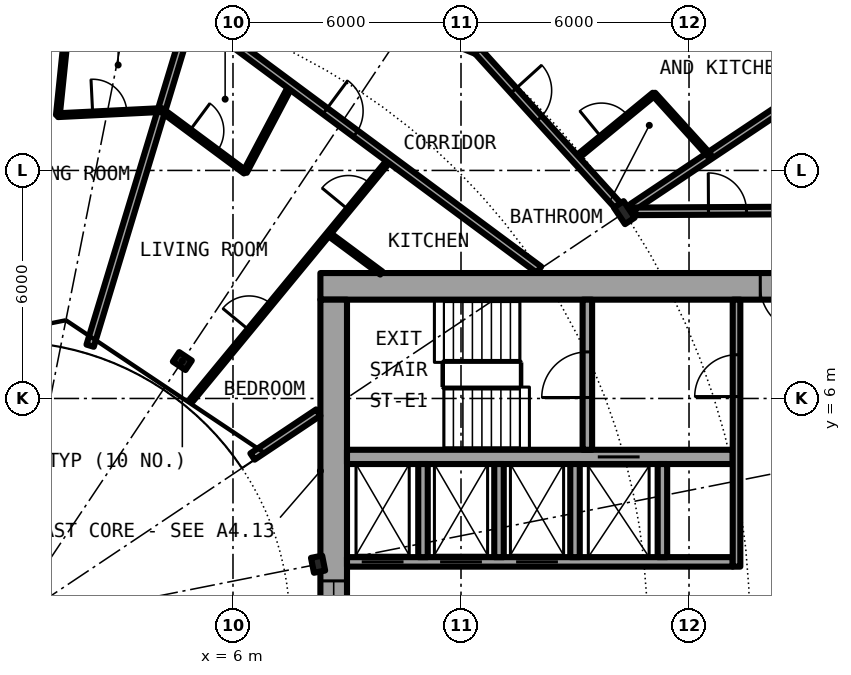
"""IFC4 building model, lengths in metres.
Left out: names, types, materials, properties, quantities, classifications, styles, units other than length and angle.
Written with IfcOpenShell. Run it as: python <this file> out.ifc"""

import sys

from ifc_helpers import new_model, si_unit, direction, frame, frame_2d, origin, origin_2d, place, context, subcontext, project, spatial, rectangle, i_section, extrude, element, fill, save


model = new_model("IFC4")
c1 = context("Model", 3, precision=1e-05, world=origin(), true_north=direction((0.0, 1.0)))
c2 = subcontext(c1, "Body", "Model", "MODEL_VIEW")
j1 = project(units=[si_unit("LENGTHUNIT", "METRE"), si_unit("PLANEANGLEUNIT", "RADIAN")], contexts=[c1])
p1 = place(None, origin())
s1 = spatial("IfcSite", under=j1, at=p1, CompositionType="ELEMENT")
p2 = place(p1, origin())
s2 = spatial("IfcBuilding", under=s1, at=p2, CompositionType="ELEMENT")
p3 = place(p2, frame((0.0, 0.0, 69.7)))
s3 = spatial("IfcBuildingStorey", under=s2, at=p3, CompositionType="ELEMENT", Elevation=69.7)
p4 = place(p3, frame((16.297, 10.889, 0.0), z_axis=(0.0, 0.0, 1.0), x_axis=(0.831469612303, 0.55557023302, 0.0)))
e1 = element("IfcColumn", 1, at=p4, inside=s3, PredefinedType="COLUMN", context=c2, shape_type="SweptSolid", body=[
    extrude(i_section(OverallWidth=0.306, OverallDepth=0.524, WebThickness=0.021, FlangeThickness=0.04, FilletRadius=0.027, at=origin_2d()), origin(), (0.0, 0.0, 1.0), 3.05),
])
for number, where, z_axis, x_axis in (
    (2, (8.239, 1.639, 0.0), (0.0, 0.0, 1.0), (0.981, 0.195, 0.0)),
    (3, (4.667, 6.984, 0.0), (0.0, 0.0, 1.0), (0.556, 0.831, 0.0)),
):
    element("IfcColumn", number, at=place(p3, frame(where, z_axis=z_axis, x_axis=x_axis)), inside=s3, PredefinedType="COLUMN", context=c2, shape_type="SweptSolid", body=[
        extrude(i_section(OverallWidth=0.3, OverallDepth=0.4, WebThickness=0.013, FlangeThickness=0.024, FilletRadius=0.027, at=origin_2d()), origin(), (0.0, 0.0, 1.0), 3.05),
    ])
p5 = place(p3, frame((22.699, 15.167, 0.0), z_axis=(0.0, 0.0, 1.0), x_axis=(-0.634382322723, 0.773019449054, 0.0)))
e4 = element("IfcWall", 4, at=p5, inside=s3, PredefinedType="SOLIDWALL", context=c2, shape_type="SweptSolid", body=[
    extrude(rectangle(XDim=5.352, YDim=0.25, at=frame_2d((2.676, 0.0))), origin(), (0.0, 0.0, 1.0), 2.7),
])
p6 = place(p5, frame((0.841, 0.0, 0.0)))
e5 = element("IfcOpeningElement", 5, at=p6, cuts=e4, PredefinedType="OPENING", context=c2, shape_type="SweptSolid", body=[
    extrude(rectangle(XDim=1.0, YDim=2.2, at=frame_2d((0.5, 1.1))), frame((0.0, 0.135, 0.0), z_axis=(0.0, -1.0, 0.0), x_axis=(1.0, 0.0, 0.0)), (0.0, 0.0, 1.0), 0.27),
])
p7 = place(p5, frame((3.111, 0.0, 0.3)))
e6 = element("IfcOpeningElement", 6, at=p7, cuts=e4, PredefinedType="OPENING", context=c2, shape_type="SweptSolid", body=[
    extrude(rectangle(XDim=1.8, YDim=2.1, at=frame_2d((0.9, 1.05))), frame((0.0, 0.135, 0.0), z_axis=(0.0, -1.0, 0.0), x_axis=(1.0, 0.0, 0.0)), (0.0, 0.0, 1.0), 0.27),
])
p8 = place(p3, frame((22.3, 8.95, 0.0), z_axis=(0.0, 0.0, 1.0), x_axis=(-1.0, 0.0, 0.0)))
e7 = element("IfcWall", 7, at=p8, inside=s3, PredefinedType="SHEAR", context=c2, shape_type="SweptSolid", body=[
    extrude(rectangle(XDim=14.0, YDim=0.7, at=frame_2d((7.0, 0.0))), origin(), (0.0, 0.0, 1.0), 3.05),
])
p9 = place(p8, frame((1.225, 0.0, 0.0)))
e8 = element("IfcOpeningElement", 8, at=p9, cuts=e7, PredefinedType="OPENING", context=c2, shape_type="SweptSolid", body=[
    extrude(rectangle(XDim=1.2, YDim=2.3, at=frame_2d((0.6, 1.15))), frame((0.0, 0.36, 0.0), z_axis=(0.0, -1.0, 0.0), x_axis=(1.0, 0.0, 0.0)), (0.0, 0.0, 1.0), 0.72),
])
p10 = place(p3, frame((8.65, -8.6, 0.0), z_axis=(0.0, 0.0, 1.0), x_axis=(0.0, 1.0, 0.0)))
e9 = element("IfcWall", 9, at=p10, inside=s3, PredefinedType="SHEAR", context=c2, shape_type="SweptSolid", body=[
    extrude(rectangle(XDim=17.2, YDim=0.7, at=frame_2d((8.6, 0.0))), origin(), (0.0, 0.0, 1.0), 3.05),
])
p11 = place(p10, frame((7.4, 0.0, 0.1)))
e10 = element("IfcOpeningElement", 10, at=p11, cuts=e9, PredefinedType="OPENING", context=c2, shape_type="SweptSolid", body=[
    extrude(rectangle(XDim=2.4, YDim=2.2, at=frame_2d((1.2, 1.1))), frame((0.0, 0.36, 0.0), z_axis=(0.0, -1.0, 0.0), x_axis=(1.0, 0.0, 0.0)), (0.0, 0.0, 1.0), 0.72),
])
p12 = place(p3, frame((9.0, 1.7, 0.0), z_axis=(0.0, 0.0, 1.0), x_axis=(1.0, 0.0, 0.0)))
e11 = element("IfcWall", 11, at=p12, inside=s3, PredefinedType="SHEAR", context=c2, shape_type="SweptSolid", body=[
    extrude(rectangle(XDim=10.15, YDim=0.25, at=frame_2d((5.075, 0.0))), origin(), (0.0, 0.0, 1.0), 3.05),
])
p13 = place(p12, frame((0.387, 0.0, 0.0)))
e12 = element("IfcOpeningElement", 12, at=p13, cuts=e11, PredefinedType="OPENING", context=c2, shape_type="SweptSolid", body=[
    extrude(rectangle(XDim=1.1, YDim=2.3, at=frame_2d((0.55, 1.15))), frame((0.0, 0.135, 0.0), z_axis=(0.0, -1.0, 0.0), x_axis=(1.0, 0.0, 0.0)), (0.0, 0.0, 1.0), 0.27),
])
p14 = place(p12, frame((2.45, 0.0, 0.0)))
e13 = element("IfcOpeningElement", 13, at=p14, cuts=e11, PredefinedType="OPENING", context=c2, shape_type="SweptSolid", body=[
    extrude(rectangle(XDim=1.1, YDim=2.3, at=frame_2d((0.55, 1.15))), frame((0.0, 0.135, 0.0), z_axis=(0.0, -1.0, 0.0), x_axis=(1.0, 0.0, 0.0)), (0.0, 0.0, 1.0), 0.27),
])
p15 = place(p12, frame((4.45, 0.0, 0.0)))
e14 = element("IfcOpeningElement", 14, at=p15, cuts=e11, PredefinedType="OPENING", context=c2, shape_type="SweptSolid", body=[
    extrude(rectangle(XDim=1.1, YDim=2.3, at=frame_2d((0.55, 1.15))), frame((0.0, 0.135, 0.0), z_axis=(0.0, -1.0, 0.0), x_axis=(1.0, 0.0, 0.0)), (0.0, 0.0, 1.0), 0.27),
])
p16 = place(p3, frame((9.0, 4.462, 0.0), z_axis=(0.0, 0.0, 1.0), x_axis=(1.0, 0.0, 0.0)))
e15 = element("IfcWall", 15, at=p16, inside=s3, PredefinedType="SHEAR", context=c2, shape_type="SweptSolid", body=[
    extrude(rectangle(XDim=10.15, YDim=0.375, at=frame_2d((5.075, 0.0))), origin(), (0.0, 0.0, 1.0), 3.05),
])
p17 = place(p16, frame((6.6, 0.0, 0.0)))
e16 = element("IfcOpeningElement", 16, at=p17, cuts=e15, PredefinedType="OPENING", context=c2, shape_type="SweptSolid", body=[
    extrude(rectangle(XDim=1.1, YDim=2.3, at=frame_2d((0.55, 1.15))), frame((0.0, 0.198, 0.0), z_axis=(0.0, -1.0, 0.0), x_axis=(1.0, 0.0, 0.0)), (0.0, 0.0, 1.0), 0.395),
])
p18 = place(p3, frame((15.325, 4.65, 0.0), z_axis=(0.0, 0.0, 1.0), x_axis=(0.0, 1.0, 0.0)))
e17 = element("IfcWall", 17, at=p18, inside=s3, PredefinedType="SHEAR", context=c2, shape_type="SweptSolid", body=[
    extrude(rectangle(XDim=3.95, YDim=0.25, at=frame_2d((1.975, 0.0))), origin(), (0.0, 0.0, 1.0), 3.05),
])
p19 = place(p18, frame((1.375, 0.0, 0.0)))
e18 = element("IfcOpeningElement", 18, at=p19, cuts=e17, PredefinedType="OPENING", context=c2, shape_type="SweptSolid", body=[
    extrude(rectangle(XDim=1.2, YDim=2.3, at=frame_2d((0.6, 1.15))), frame((0.0, 0.135, 0.0), z_axis=(0.0, -1.0, 0.0), x_axis=(1.0, 0.0, 0.0)), (0.0, 0.0, 1.0), 0.27),
])
for number, where, z_axis, x_axis in (
    (19, (15.0, 1.825, 0.0), (0.0, 0.0, 1.0), (0.0, 1.0, 0.0)),
    (20, (17.3, 1.825, 0.0), (0.0, 0.0, 1.0), (0.0, 1.0, 0.0)),
):
    element("IfcWall", number, at=place(p3, frame(where, z_axis=z_axis, x_axis=x_axis)), inside=s3, PredefinedType="SOLIDWALL", context=c2, shape_type="SweptSolid", body=[
        extrude(rectangle(XDim=2.45, YDim=0.25, at=frame_2d((1.225, 0.0))), origin(), (0.0, 0.0, 1.0), 2.7),
    ])
p20 = place(p3, frame((19.25, 1.575, 0.0), z_axis=(0.0, 0.0, 1.0), x_axis=(0.0, 1.0, 0.0)))
e21 = element("IfcWall", 21, at=p20, inside=s3, PredefinedType="SOLIDWALL", context=c2, shape_type="SweptSolid", body=[
    extrude(rectangle(XDim=7.025, YDim=0.2, at=frame_2d((3.513, 0.0))), origin(), (0.0, 0.0, 1.0), 2.7),
])
p21 = place(p20, frame((4.475, 0.0, 0.0)))
e22 = element("IfcOpeningElement", 22, at=p21, cuts=e21, PredefinedType="OPENING", context=c2, shape_type="SweptSolid", body=[
    extrude(rectangle(XDim=1.1, YDim=2.3, at=frame_2d((0.55, 1.15))), frame((0.0, 0.11, 0.0), z_axis=(0.0, -1.0, 0.0), x_axis=(1.0, 0.0, 0.0)), (0.0, 0.0, 1.0), 0.22),
])
for number, where, z_axis, x_axis in (
    (23, (11.0, 1.825, 0.0), (0.0, 0.0, 1.0), (0.0, 1.0, 0.0)),
    (24, (13.0, 1.825, 0.0), (0.0, 0.0, 1.0), (0.0, 1.0, 0.0)),
):
    element("IfcWall", number, at=place(p3, frame(where, z_axis=z_axis, x_axis=x_axis)), inside=s3, PredefinedType="SOLIDWALL", context=c2, shape_type="SweptSolid", body=[
        extrude(rectangle(XDim=2.45, YDim=0.25, at=frame_2d((1.225, 0.0))), origin(), (0.0, 0.0, 1.0), 2.7),
    ])
p22 = place(p3, frame((16.515, 11.034, 0.0), z_axis=(0.0, 0.0, 1.0), x_axis=(0.831382022135, 0.555701298605, 0.0)))
e25 = element("IfcWall", 25, at=p22, inside=s3, PredefinedType="PARTITIONING", context=c2, shape_type="SweptSolid", body=[
    extrude(rectangle(XDim=7.313, YDim=0.2, at=frame_2d((3.657, 0.0))), origin(), (0.0, 0.0, 1.0), 2.7),
])
p23 = place(p3, frame((1.392, 13.454, 0.0), z_axis=(0.0, 0.0, 1.0), x_axis=(0.102594773028, 0.994723234145, 0.0)))
e26 = element("IfcWall", 26, at=p23, inside=s3, PredefinedType="PARTITIONING", context=c2, shape_type="SweptSolid", body=[
    extrude(rectangle(XDim=2.573, YDim=0.1, at=frame_2d((1.286, 0.0))), origin(), (0.0, 0.0, 1.0), 2.7),
])
p24 = place(p3, frame((2.241, 7.388, 0.0), z_axis=(0.0, 0.0, 1.0), x_axis=(0.290323311932, 0.956928615179, 0.0)))
e27 = element("IfcWall", 27, at=p24, inside=s3, PredefinedType="PARTITIONING", context=c2, shape_type="SweptSolid", body=[
    extrude(rectangle(XDim=9.179, YDim=0.2, at=frame_2d((4.59, 0.0))), origin(), (0.0, 0.0, 1.0), 2.7),
])
p25 = place(p3, frame((4.909, 5.958, 0.0), z_axis=(0.0, 0.0, 1.0), x_axis=(0.635976043025, 0.771708800454, 0.0)))
e28 = element("IfcWall", 28, at=p25, inside=s3, PredefinedType="PARTITIONING", context=c2, shape_type="SweptSolid", body=[
    extrude(rectangle(XDim=8.213, YDim=0.1, at=frame_2d((4.106, 0.0))), origin(), (0.0, 0.0, 1.0), 2.7),
])
p26 = place(p25, frame((6.49, 0.0, 0.0)))
e29 = element("IfcOpeningElement", 29, at=p26, cuts=e28, PredefinedType="OPENING", context=c2, shape_type="SweptSolid", body=[
    extrude(rectangle(XDim=0.9, YDim=2.3, at=frame_2d((0.45, 1.15))), frame((0.0, 0.06, 0.0), z_axis=(0.0, -1.0, 0.0), x_axis=(1.0, 0.0, 0.0)), (0.0, 0.0, 1.0), 0.12),
])
p27 = place(p25, frame((2.384, 0.0, 0.0)))
e30 = element("IfcOpeningElement", 30, at=p27, cuts=e28, PredefinedType="OPENING", context=c2, shape_type="SweptSolid", body=[
    extrude(rectangle(XDim=0.9, YDim=2.3, at=frame_2d((0.45, 1.15))), frame((0.0, 0.06, 0.0), z_axis=(0.0, -1.0, 0.0), x_axis=(1.0, 0.0, 0.0)), (0.0, 0.0, 1.0), 0.12),
])
p28 = place(p3, frame((6.318, 11.96, 0.0), z_axis=(0.0, 0.0, 1.0), x_axis=(0.467001992543, 0.884256263173, 0.0)))
e31 = element("IfcWall", 31, at=p28, inside=s3, PredefinedType="PARTITIONING", context=c2, shape_type="SweptSolid", body=[
    extrude(rectangle(XDim=2.572, YDim=0.1, at=frame_2d((1.286, 0.0))), origin(), (0.0, 0.0, 1.0), 2.7),
])
p29 = place(p3, frame((12.435, 15.15, 0.0), z_axis=(0.0, 0.0, 1.0), x_axis=(0.634458323308, 0.772957072537, 0.0)))
e32 = element("IfcWall", 32, at=p29, inside=s3, PredefinedType="PARTITIONING", context=c2, shape_type="SweptSolid", body=[
    extrude(rectangle(XDim=7.576, YDim=0.2, at=frame_2d((3.788, 0.0))), origin(), (0.0, 0.0, 1.0), 2.7),
])
p30 = place(p3, frame((15.009, 12.31, 0.0), z_axis=(0.0, 0.0, 1.0), x_axis=(0.77319617123, 0.634166918717, 0.0)))
e33 = element("IfcWall", 33, at=p30, inside=s3, PredefinedType="PARTITIONING", context=c2, shape_type="SweptSolid", body=[
    extrude(rectangle(XDim=2.675, YDim=0.1, at=frame_2d((1.337, 0.0))), origin(), (0.0, 0.0, 1.0), 2.7),
])
p31 = place(p30, frame((0.887, 0.0, 0.0)))
e34 = element("IfcOpeningElement", 34, at=p31, cuts=e33, PredefinedType="OPENING", context=c2, shape_type="SweptSolid", body=[
    extrude(rectangle(XDim=0.9, YDim=2.3, at=frame_2d((0.45, 1.15))), frame((0.0, 0.06, 0.0), z_axis=(0.0, -1.0, 0.0), x_axis=(1.0, 0.0, 0.0)), (0.0, 0.0, 1.0), 0.12),
])
p32 = place(p3, frame((6.513, 4.472, 0.0), z_axis=(0.0, 0.0, 1.0), x_axis=(0.831382204863, 0.555701025225, 0.0)))
e35 = element("IfcWall", 35, at=p32, inside=s3, PredefinedType="PARTITIONING", context=c2, shape_type="SweptSolid", body=[
    extrude(rectangle(XDim=2.082, YDim=0.2, at=frame_2d((1.041, 0.0))), origin(), (0.0, 0.0, 1.0), 2.7),
])
p33 = place(p3, frame((16.589, 10.924, 0.0), z_axis=(0.0, 0.0, 1.0), x_axis=(0.999987054722, 0.005088259783, 0.0)))
e36 = element("IfcWall", 36, at=p33, inside=s3, PredefinedType="PARTITIONING", context=c2, shape_type="SweptSolid", body=[
    extrude(rectangle(XDim=5.086, YDim=0.2, at=frame_2d((2.543, 0.0))), origin(), (0.0, 0.0, 1.0), 2.7),
])
p34 = place(p33, frame((1.923, 0.0, 0.0)))
e37 = element("IfcOpeningElement", 37, at=p34, cuts=e36, PredefinedType="OPENING", context=c2, shape_type="SweptSolid", body=[
    extrude(rectangle(XDim=1.0, YDim=2.3, at=frame_2d((0.5, 1.15))), frame((0.0, 0.11, 0.0), z_axis=(0.0, -1.0, 0.0), x_axis=(1.0, 0.0, 0.0)), (0.0, 0.0, 1.0), 0.22),
])
p35 = place(p3, frame((1.392, 13.454, 0.0), z_axis=(0.0, 0.0, 1.0), x_axis=(0.998779365748, 0.049394114582, 0.0)))
e38 = element("IfcWall", 38, at=p35, inside=s3, PredefinedType="PARTITIONING", context=c2, shape_type="SweptSolid", body=[
    extrude(rectangle(XDim=2.733, YDim=0.1, at=frame_2d((1.367, 0.0))), origin(), (0.0, 0.0, 1.0), 2.7),
])
p36 = place(p35, frame((0.917, 0.0, 0.0)))
e39 = element("IfcOpeningElement", 39, at=p36, cuts=e38, PredefinedType="OPENING", context=c2, shape_type="SweptSolid", body=[
    extrude(rectangle(XDim=0.9, YDim=2.3, at=frame_2d((0.45, 1.15))), frame((0.0, 0.06, 0.0), z_axis=(0.0, -1.0, 0.0), x_axis=(1.0, 0.0, 0.0)), (0.0, 0.0, 1.0), 0.12),
])
p37 = place(p3, frame((4.122, 13.589, 0.0), z_axis=(0.0, 0.0, 1.0), x_axis=(0.803128348509, -0.595806055542, 0.0)))
e40 = element("IfcWall", 40, at=p37, inside=s3, PredefinedType="PARTITIONING", context=c2, shape_type="SweptSolid", body=[
    extrude(rectangle(XDim=2.734, YDim=0.1, at=frame_2d((1.367, 0.0))), origin(), (0.0, 0.0, 1.0), 2.7),
])
p38 = place(p37, frame((0.917, 0.0, 0.0)))
e41 = element("IfcOpeningElement", 41, at=p38, cuts=e40, PredefinedType="OPENING", context=c2, shape_type="SweptSolid", body=[
    extrude(rectangle(XDim=0.9, YDim=2.3, at=frame_2d((0.45, 1.15))), frame((0.0, 0.06, 0.0), z_axis=(0.0, -1.0, 0.0), x_axis=(1.0, 0.0, 0.0)), (0.0, 0.0, 1.0), 0.12),
])
p39 = place(p3, frame((8.512, 10.332, 0.0), z_axis=(0.0, 0.0, 1.0), x_axis=(0.803135014325, -0.595797070121, 0.0)))
e42 = element("IfcWall", 42, at=p39, inside=s3, PredefinedType="PARTITIONING", context=c2, shape_type="SweptSolid", body=[
    extrude(rectangle(XDim=1.732, YDim=0.1, at=frame_2d((0.866, 0.0))), origin(), (0.0, 0.0, 1.0), 2.7),
])
p40 = place(p3, frame((4.906, 16.172, 0.0), z_axis=(0.0, 0.0, 1.0), x_axis=(0.803204584823, -0.59570327758, 0.0)))
e43 = element("IfcWall", 43, at=p40, inside=s3, PredefinedType="PARTITIONING", context=c2, shape_type="SweptSolid", body=[
    extrude(rectangle(XDim=11.387, YDim=0.2, at=frame_2d((5.693, 0.0))), origin(), (0.0, 0.0, 1.0), 2.7),
])
p41 = place(p40, frame((4.38, 0.0, 0.0)))
e44 = element("IfcOpeningElement", 44, at=p41, cuts=e43, PredefinedType="OPENING", context=c2, shape_type="SweptSolid", body=[
    extrude(rectangle(XDim=1.0, YDim=2.3, at=frame_2d((0.5, 1.15))), frame((0.0, 0.11, 0.0), z_axis=(0.0, -1.0, 0.0), x_axis=(1.0, 0.0, 0.0)), (0.0, 0.0, 1.0), 0.22),
])
p42 = place(p3, frame((1.921, 19.506, 0.0), z_axis=(0.0, 0.0, 1.0), x_axis=(0.923845560554, -0.38276543763, 0.0)))
e45 = element("IfcWall", 45, at=p42, inside=s3, PredefinedType="PARTITIONING", context=c2, shape_type="SweptSolid", body=[
    extrude(rectangle(XDim=11.381, YDim=0.2, at=frame_2d((5.69, 0.0))), origin(), (0.0, 0.0, 1.0), 2.7),
])
p43 = place(p42, frame((7.087, 0.0, 0.0)))
e46 = element("IfcOpeningElement", 46, at=p43, cuts=e45, PredefinedType="OPENING", context=c2, shape_type="SweptSolid", body=[
    extrude(rectangle(XDim=1.0, YDim=2.3, at=frame_2d((0.5, 1.15))), frame((0.0, 0.11, 0.0), z_axis=(0.0, -1.0, 0.0), x_axis=(1.0, 0.0, 0.0)), (0.0, 0.0, 1.0), 0.22),
])
p44 = place(p3, frame((12.434, 15.151, 0.0), z_axis=(0.0, 0.0, 1.0), x_axis=(0.671601747072, -0.740912338492, 0.0)))
e47 = element("IfcWall", 47, at=p44, inside=s3, PredefinedType="PARTITIONING", context=c2, shape_type="SweptSolid", body=[
    extrude(rectangle(XDim=5.597, YDim=0.2, at=frame_2d((2.799, 0.0))), origin(), (0.0, 0.0, 1.0), 2.38),
])
p45 = place(p44, frame((1.417, 0.0, 0.0)))
e48 = element("IfcOpeningElement", 48, at=p45, cuts=e47, PredefinedType="OPENING", context=c2, shape_type="SweptSolid", body=[
    extrude(rectangle(XDim=1.0, YDim=2.3, at=frame_2d((0.5, 1.15))), frame((0.0, 0.11, 0.0), z_axis=(0.0, -1.0, 0.0), x_axis=(1.0, 0.0, 0.0)), (0.0, 0.0, 1.0), 0.22),
])
p46 = place(p3, frame((17.072, 14.011, 0.0), z_axis=(0.0, 0.0, 1.0), x_axis=(0.67169789574, -0.740825172937, 0.0)))
e49 = element("IfcWall", 49, at=p46, inside=s3, PredefinedType="PARTITIONING", context=c2, shape_type="SweptSolid", body=[
    extrude(rectangle(XDim=2.183, YDim=0.1, at=frame_2d((1.091, 0.0))), origin(), (0.0, 0.0, 1.0), 2.7),
])
p47 = place(p13, origin())
e50 = element("IfcDoor", 50, at=p47, inside=s3, OperationType="DOUBLE_DOOR_SLIDING", PredefinedType="DOOR", context=c2, shape_type="SweptSolid", body=[
    extrude(rectangle(XDim=1.1, YDim=2.3, at=frame_2d((0.55, 1.15))), frame((0.0, 0.025, 0.0), z_axis=(0.0, -1.0, 0.0), x_axis=(1.0, 0.0, 0.0)), (0.0, 0.0, 1.0), 0.05),
])
fill(e12, e50)
p48 = place(p14, origin())
e51 = element("IfcDoor", 51, at=p48, inside=s3, OperationType="DOUBLE_DOOR_SLIDING", PredefinedType="DOOR", context=c2, shape_type="SweptSolid", body=[
    extrude(rectangle(XDim=1.1, YDim=2.3, at=frame_2d((0.55, 1.15))), frame((0.0, 0.025, 0.0), z_axis=(0.0, -1.0, 0.0), x_axis=(1.0, 0.0, 0.0)), (0.0, 0.0, 1.0), 0.05),
])
fill(e13, e51)
p49 = place(p15, origin())
e52 = element("IfcDoor", 52, at=p49, inside=s3, OperationType="DOUBLE_DOOR_SLIDING", PredefinedType="DOOR", context=c2, shape_type="SweptSolid", body=[
    extrude(rectangle(XDim=1.1, YDim=2.3, at=frame_2d((0.55, 1.15))), frame((0.0, 0.025, 0.0), z_axis=(0.0, -1.0, 0.0), x_axis=(1.0, 0.0, 0.0)), (0.0, 0.0, 1.0), 0.05),
])
fill(e14, e52)
p50 = place(p17, origin())
e53 = element("IfcDoor", 53, at=p50, inside=s3, OperationType="DOUBLE_DOOR_SLIDING", PredefinedType="DOOR", context=c2, shape_type="SweptSolid", body=[
    extrude(rectangle(XDim=1.1, YDim=2.3, at=frame_2d((0.55, 1.15))), frame((0.0, 0.025, 0.0), z_axis=(0.0, -1.0, 0.0), x_axis=(1.0, 0.0, 0.0)), (0.0, 0.0, 1.0), 0.05),
])
fill(e16, e53)
p51 = place(p19, origin())
e54 = element("IfcDoor", 54, at=p51, inside=s3, OperationType="SINGLE_SWING_LEFT", PredefinedType="DOOR", context=c2, shape_type="SweptSolid", body=[
    extrude(rectangle(XDim=1.2, YDim=2.3, at=frame_2d((0.6, 1.15))), frame((0.0, 0.025, 0.0), z_axis=(0.0, -1.0, 0.0), x_axis=(1.0, 0.0, 0.0)), (0.0, 0.0, 1.0), 0.05),
])
fill(e18, e54)
p52 = place(p21, origin())
e55 = element("IfcDoor", 55, at=p52, inside=s3, OperationType="SINGLE_SWING_LEFT", PredefinedType="DOOR", context=c2, shape_type="SweptSolid", body=[
    extrude(rectangle(XDim=1.1, YDim=2.3, at=frame_2d((0.55, 1.15))), frame((0.0, 0.025, 0.0), z_axis=(0.0, -1.0, 0.0), x_axis=(1.0, 0.0, 0.0)), (0.0, 0.0, 1.0), 0.05),
])
fill(e22, e55)
p53 = place(p9, origin())
e56 = element("IfcDoor", 56, at=p53, inside=s3, OperationType="SINGLE_SWING_RIGHT", PredefinedType="DOOR", context=c2, shape_type="SweptSolid", body=[
    extrude(rectangle(XDim=1.2, YDim=2.3, at=frame_2d((0.6, 1.15))), frame((0.0, 0.025, 0.0), z_axis=(0.0, -1.0, 0.0), x_axis=(1.0, 0.0, 0.0)), (0.0, 0.0, 1.0), 0.05),
])
fill(e8, e56)
p54 = place(p11, origin())
e57 = element("IfcWindow", 57, at=p54, inside=s3, PartitioningType="SINGLE_PANEL", PredefinedType="WINDOW", context=c2, shape_type="SweptSolid", body=[
    extrude(rectangle(XDim=2.4, YDim=2.2, at=frame_2d((1.2, 1.1))), frame((0.0, 0.03, 0.0), z_axis=(0.0, -1.0, 0.0), x_axis=(1.0, 0.0, 0.0)), (0.0, 0.0, 1.0), 0.06),
])
fill(e10, e57)
p55 = place(p45, origin())
e58 = element("IfcDoor", 58, at=p55, inside=s3, OperationType="SINGLE_SWING_LEFT", PredefinedType="DOOR", context=c2, shape_type="SweptSolid", body=[
    extrude(rectangle(XDim=1.0, YDim=2.3, at=frame_2d((0.5, 1.15))), frame((0.0, 0.025, 0.0), z_axis=(0.0, -1.0, 0.0), x_axis=(1.0, 0.0, 0.0)), (0.0, 0.0, 1.0), 0.05),
])
fill(e48, e58)
p56 = place(p31, origin())
e59 = element("IfcDoor", 59, at=p56, inside=s3, OperationType="SINGLE_SWING_RIGHT", PredefinedType="DOOR", context=c2, shape_type="SweptSolid", body=[
    extrude(rectangle(XDim=0.9, YDim=2.3, at=frame_2d((0.45, 1.15))), frame((0.0, 0.025, 0.0), z_axis=(0.0, -1.0, 0.0), x_axis=(1.0, 0.0, 0.0)), (0.0, 0.0, 1.0), 0.05),
])
fill(e34, e59)
p57 = place(p41, origin())
e60 = element("IfcDoor", 60, at=p57, inside=s3, OperationType="SINGLE_SWING_LEFT", PredefinedType="DOOR", context=c2, shape_type="SweptSolid", body=[
    extrude(rectangle(XDim=1.0, YDim=2.3, at=frame_2d((0.5, 1.15))), frame((0.0, 0.025, 0.0), z_axis=(0.0, -1.0, 0.0), x_axis=(1.0, 0.0, 0.0)), (0.0, 0.0, 1.0), 0.05),
])
fill(e44, e60)
p58 = place(p38, origin())
e61 = element("IfcDoor", 61, at=p58, inside=s3, OperationType="SINGLE_SWING_LEFT", PredefinedType="DOOR", context=c2, shape_type="SweptSolid", body=[
    extrude(rectangle(XDim=0.9, YDim=2.3, at=frame_2d((0.45, 1.15))), frame((0.0, 0.025, 0.0), z_axis=(0.0, -1.0, 0.0), x_axis=(1.0, 0.0, 0.0)), (0.0, 0.0, 1.0), 0.05),
])
fill(e41, e61)
p59 = place(p26, origin())
e62 = element("IfcDoor", 62, at=p59, inside=s3, OperationType="SINGLE_SWING_RIGHT", PredefinedType="DOOR", context=c2, shape_type="SweptSolid", body=[
    extrude(rectangle(XDim=0.9, YDim=2.3, at=frame_2d((0.45, 1.15))), frame((0.0, 0.025, 0.0), z_axis=(0.0, -1.0, 0.0), x_axis=(1.0, 0.0, 0.0)), (0.0, 0.0, 1.0), 0.05),
])
fill(e29, e62)
p60 = place(p27, origin())
e63 = element("IfcDoor", 63, at=p60, inside=s3, OperationType="SINGLE_SWING_LEFT", PredefinedType="DOOR", context=c2, shape_type="SweptSolid", body=[
    extrude(rectangle(XDim=0.9, YDim=2.3, at=frame_2d((0.45, 1.15))), frame((0.0, 0.025, 0.0), z_axis=(0.0, -1.0, 0.0), x_axis=(1.0, 0.0, 0.0)), (0.0, 0.0, 1.0), 0.05),
])
fill(e30, e63)
p61 = place(p36, origin())
e64 = element("IfcDoor", 64, at=p61, inside=s3, OperationType="SINGLE_SWING_RIGHT", PredefinedType="DOOR", context=c2, shape_type="SweptSolid", body=[
    extrude(rectangle(XDim=0.9, YDim=2.3, at=frame_2d((0.45, 1.15))), frame((0.0, 0.025, 0.0), z_axis=(0.0, -1.0, 0.0), x_axis=(1.0, 0.0, 0.0)), (0.0, 0.0, 1.0), 0.05),
])
fill(e39, e64)
p62 = place(p34, origin())
e65 = element("IfcDoor", 65, at=p62, inside=s3, OperationType="SINGLE_SWING_LEFT", PredefinedType="DOOR", context=c2, shape_type="SweptSolid", body=[
    extrude(rectangle(XDim=1.0, YDim=2.3, at=frame_2d((0.5, 1.15))), frame((0.0, 0.025, 0.0), z_axis=(0.0, -1.0, 0.0), x_axis=(1.0, 0.0, 0.0)), (0.0, 0.0, 1.0), 0.05),
])
fill(e37, e65)
save(model, sys.argv[1])
